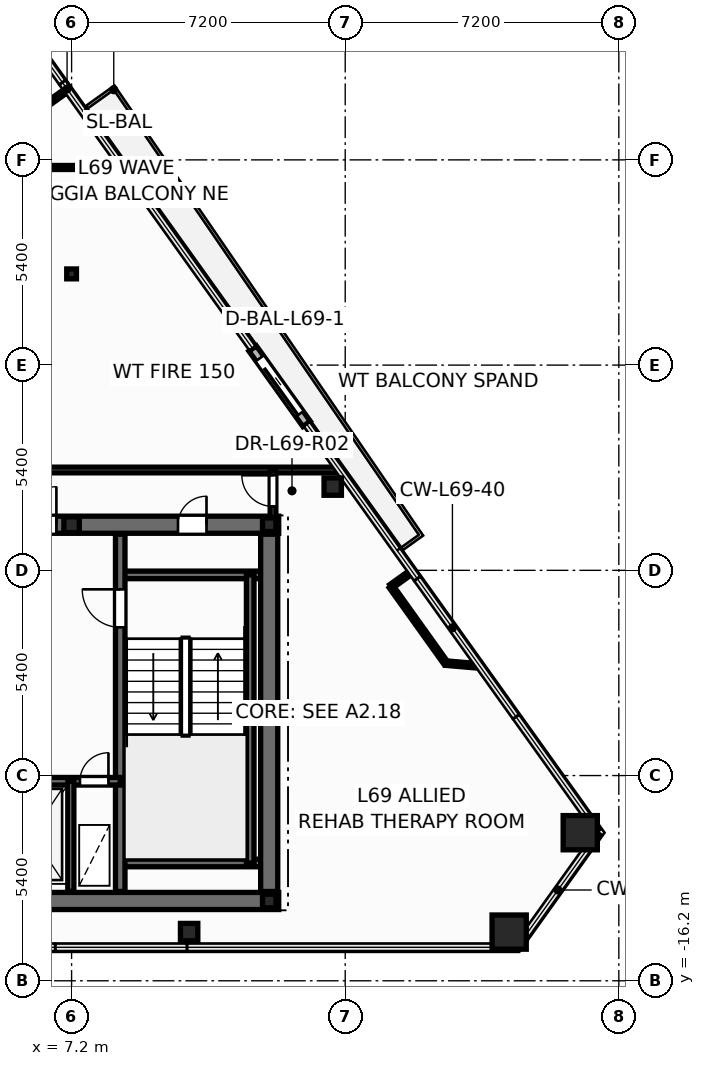
"""IFC4 building model, lengths in metres.
Left out: names, types, materials, properties, quantities, classifications, styles, units other than length and angle.
Written with IfcOpenShell. Run it as: python <this file> out.ifc"""

import sys

from ifc_helpers import new_model, si_unit, direction, frame, frame_2d, origin, origin_2d, place, context, subcontext, project, spatial, rectangle, hollow_rectangle, hollow_circle, i_section, extrude, element, fill, save


model = new_model("IFC4")
c1 = context("Model", 3, precision=1e-05, world=origin(), true_north=direction((0.0, 1.0)))
c2 = subcontext(c1, "Body", "Model", "MODEL_VIEW")
j1 = project(units=[si_unit("LENGTHUNIT", "METRE"), si_unit("PLANEANGLEUNIT", "RADIAN")], contexts=[c1])
p1 = place(None, origin())
s1 = spatial("IfcSite", under=j1, at=p1, CompositionType="ELEMENT")
p2 = place(p1, origin())
s2 = spatial("IfcBuilding", under=s1, at=p2, CompositionType="ELEMENT")
p3 = place(p2, frame((0.0, 0.0, 263.4)))
s3 = spatial("IfcBuildingStorey", under=s2, at=p3, CompositionType="ELEMENT", Elevation=263.4)
for number, where, z_axis, x_axis in (
    (1, (18.714, -14.919, 0.0), (0.0, 0.0, 1.0), (1.0, 0.0, 0.0)),
    (2, (20.585, -12.303, 0.0), (0.0, 0.0, 1.0), (1.0, 0.0, 0.0)),
):
    element("IfcColumn", number, at=place(p3, frame(where, z_axis=z_axis, x_axis=x_axis)), inside=s3, PredefinedType="COLUMN", context=c2, shape_type="SweptSolid", body=[
        extrude(hollow_rectangle(XDim=0.9, YDim=0.9, WallThickness=0.04, at=origin_2d()), origin(), (0.0, 0.0, 1.0), 3.6),
    ])
for number, where, z_axis, x_axis in (
    (3, (10.293, -14.919, 0.0), (0.0, 0.0, 1.0), (1.0, 0.0, 0.0)),
    (4, (14.072, -3.196, 0.0), (0.0, 0.0, 1.0), (1.0, 0.0, 0.0)),
    (5, (8.489, 4.61, 0.0), (0.0, 0.0, 1.0), (1.0, 0.0, 0.0)),
):
    element("IfcColumn", number, at=place(p3, frame(where, z_axis=z_axis, x_axis=x_axis)), inside=s3, PredefinedType="COLUMN", context=c2, shape_type="SweptSolid", body=[
        extrude(hollow_circle(Radius=0.229, WallThickness=0.016, at=origin_2d()), origin(), (0.0, 0.0, 1.0), 3.6),
    ])
for number, where, z_axis, x_axis in (
    (6, (12.4, -14.1, 0.0), (0.0, 0.0, 1.0), (1.0, 0.0, 0.0)),
    (7, (12.4, -4.2, 0.0), (0.0, 0.0, 1.0), (1.0, 0.0, 0.0)),
):
    element("IfcColumn", number, at=place(p3, frame(where, z_axis=z_axis, x_axis=x_axis)), inside=s3, PredefinedType="COLUMN", context=c2, shape_type="SweptSolid", body=[
        extrude(i_section(OverallWidth=0.352, OverallDepth=0.359, WebThickness=0.018, FlangeThickness=0.026, at=origin_2d()), origin(), (0.0, 0.0, 1.0), 3.6),
    ])
p4 = place(p3, frame((7.2, -4.2, 0.0), z_axis=(0.0, 0.0, 1.0), x_axis=(1.0, 0.0, 0.0)))
e8 = element("IfcColumn", 8, at=p4, inside=s3, PredefinedType="PILASTER", context=c2, shape_type="SweptSolid", body=[
    extrude(i_section(OverallWidth=0.405, OverallDepth=0.414, WebThickness=0.022, FlangeThickness=0.032, at=origin_2d()), origin(), (0.0, 0.0, 1.0), 3.6),
])
p5 = place(p3, frame((7.2, 2.4, 0.0), z_axis=(0.0, 0.0, 1.0), x_axis=(1.0, 0.0, 0.0)))
e9 = element("IfcColumn", 9, at=p5, inside=s3, PredefinedType="COLUMN", context=c2, shape_type="SweptSolid", body=[
    extrude(i_section(OverallWidth=0.256, OverallDepth=0.26, WebThickness=0.01, FlangeThickness=0.017, at=origin_2d()), origin(), (0.0, 0.0, 1.0), 3.6),
])
p6 = place(p3, frame((13.383, -1.547, -0.015), z_axis=(0.0, 0.0, 1.0), x_axis=(-0.58167352525, 0.813422344187, 0.0)))
e10 = element("IfcWall", 10, at=p6, inside=s3, PredefinedType="STANDARD", context=c2, shape_type="SweptSolid", body=[
    extrude(rectangle(XDim=2.44, YDim=0.24, at=frame_2d((1.22, 0.0))), origin(), (0.0, 0.0, 1.0), 2.878),
])
p7 = place(p6, frame((0.32, 0.0, 0.015)))
e11 = element("IfcOpeningElement", 11, at=p7, cuts=e10, PredefinedType="OPENING", context=c2, shape_type="SweptSolid", body=[
    extrude(rectangle(XDim=1.806, YDim=2.204, at=frame_2d((0.9, 1.102))), frame((0.0, 0.13, 0.0), z_axis=(0.0, -1.0, 0.0), x_axis=(1.0, 0.0, 0.0)), (0.0, 0.0, 1.0), 0.26),
])
p8 = place(p3, frame((-12.65, -14.1, 0.0), z_axis=(0.0, 0.0, 1.0), x_axis=(1.0, 0.0, 0.0)))
e12 = element("IfcWall", 12, at=p8, inside=s3, PredefinedType="SHEAR", context=c2, shape_type="SweptSolid", body=[
    extrude(rectangle(XDim=25.3, YDim=0.45, at=frame_2d((12.65, 0.0))), origin(), (0.0, 0.0, 1.0), 3.6),
])
p9 = place(p3, frame((-12.65, -4.2, 0.0), z_axis=(0.0, 0.0, 1.0), x_axis=(1.0, 0.0, 0.0)))
e13 = element("IfcWall", 13, at=p9, inside=s3, PredefinedType="SHEAR", context=c2, shape_type="SweptSolid", body=[
    extrude(rectangle(XDim=25.3, YDim=0.45, at=frame_2d((12.65, 0.0))), origin(), (0.0, 0.0, 1.0), 3.6),
])
p10 = place(p9, frame((1.85, 0.0, 0.0)))
e14 = element("IfcOpeningElement", 14, at=p10, cuts=e13, PredefinedType="OPENING", context=c2, shape_type="SweptSolid", body=[
    extrude(rectangle(XDim=0.756, YDim=2.054, at=frame_2d((0.375, 1.027))), frame((0.0, 0.235, 0.0), z_axis=(0.0, -1.0, 0.0), x_axis=(1.0, 0.0, 0.0)), (0.0, 0.0, 1.0), 0.47),
])
p11 = place(p9, frame((22.65, 0.0, 0.0)))
e15 = element("IfcOpeningElement", 15, at=p11, cuts=e13, PredefinedType="OPENING", context=c2, shape_type="SweptSolid", body=[
    extrude(rectangle(XDim=0.756, YDim=2.054, at=frame_2d((0.375, 1.027))), frame((0.0, 0.235, 0.0), z_axis=(0.0, -1.0, 0.0), x_axis=(1.0, 0.0, 0.0)), (0.0, 0.0, 1.0), 0.47),
])
p12 = place(p9, frame((5.85, 0.0, 0.0)))
e16 = element("IfcOpeningElement", 16, at=p12, cuts=e13, PredefinedType="OPENING", context=c2, shape_type="SweptSolid", body=[
    extrude(rectangle(XDim=1.006, YDim=2.104, at=frame_2d((0.5, 1.052))), frame((0.0, 0.235, 0.0), z_axis=(0.0, -1.0, 0.0), x_axis=(1.0, 0.0, 0.0)), (0.0, 0.0, 1.0), 0.47),
])
p13 = place(p9, frame((10.35, 0.0, 0.0)))
e17 = element("IfcOpeningElement", 17, at=p13, cuts=e13, PredefinedType="OPENING", context=c2, shape_type="SweptSolid", body=[
    extrude(rectangle(XDim=1.406, YDim=2.154, at=frame_2d((0.7, 1.077))), frame((0.0, 0.235, 0.0), z_axis=(0.0, -1.0, 0.0), x_axis=(1.0, 0.0, 0.0)), (0.0, 0.0, 1.0), 0.47),
])
p14 = place(p9, frame((18.45, 0.0, 0.0)))
e18 = element("IfcOpeningElement", 18, at=p14, cuts=e13, PredefinedType="OPENING", context=c2, shape_type="SweptSolid", body=[
    extrude(rectangle(XDim=1.006, YDim=2.104, at=frame_2d((0.5, 1.052))), frame((0.0, 0.235, 0.0), z_axis=(0.0, -1.0, 0.0), x_axis=(1.0, 0.0, 0.0)), (0.0, 0.0, 1.0), 0.47),
])
for number, where, z_axis, x_axis in (
    (19, (8.48, -5.52, 0.0), (0.0, 0.0, 1.0), (1.0, 0.0, 0.0)),
    (20, (8.48, -13.1, 0.0), (0.0, 0.0, 1.0), (1.0, 0.0, 0.0)),
):
    element("IfcWall", number, at=place(p3, frame(where, z_axis=z_axis, x_axis=x_axis)), inside=s3, PredefinedType="SOLIDWALL", context=c2, shape_type="SweptSolid", body=[
        extrude(rectangle(XDim=3.87, YDim=0.2, at=frame_2d((1.935, 0.0))), origin(), (0.0, 0.0, 1.0), 3.6),
    ])
p15 = place(p3, frame((11.9, -13.1, 0.0), z_axis=(0.0, 0.0, 1.0), x_axis=(0.0, 1.0, 0.0)))
e21 = element("IfcWall", 21, at=p15, inside=s3, PredefinedType="SOLIDWALL", context=c2, shape_type="SweptSolid", body=[
    extrude(rectangle(XDim=7.58, YDim=0.2, at=frame_2d((3.79, 0.0))), origin(), (0.0, 0.0, 1.0), 3.6),
])
p16 = place(p3, frame((8.48, -13.85, 0.0), z_axis=(0.0, 0.0, 1.0), x_axis=(0.0, 1.0, 0.0)))
e22 = element("IfcWall", 22, at=p16, inside=s3, PredefinedType="SHEAR", context=c2, shape_type="SweptSolid", body=[
    extrude(rectangle(XDim=9.4, YDim=0.25, at=frame_2d((4.7, 0.0))), origin(), (0.0, 0.0, 1.0), 3.6),
])
p17 = place(p16, frame((6.95, 0.0, 0.0)))
e23 = element("IfcOpeningElement", 23, at=p17, cuts=e22, PredefinedType="OPENING", context=c2, shape_type="SweptSolid", body=[
    extrude(rectangle(XDim=1.006, YDim=2.104, at=frame_2d((0.5, 1.052))), frame((0.0, 0.135, 0.0), z_axis=(0.0, -1.0, 0.0), x_axis=(1.0, 0.0, 0.0)), (0.0, 0.0, 1.0), 0.27),
])
p18 = place(p3, frame((5.12, -10.95, 0.0), z_axis=(0.0, 0.0, 1.0), x_axis=(1.0, 0.0, 0.0)))
e24 = element("IfcWall", 24, at=p18, inside=s3, PredefinedType="SOLIDWALL", context=c2, shape_type="SweptSolid", body=[
    extrude(rectangle(XDim=3.36, YDim=0.2, at=frame_2d((1.68, 0.0))), origin(), (0.0, 0.0, 1.0), 3.6),
])
p19 = place(p18, frame((0.42, 0.0, 0.0)))
e25 = element("IfcOpeningElement", 25, at=p19, cuts=e24, PredefinedType="OPENING", context=c2, shape_type="SweptSolid", body=[
    extrude(rectangle(XDim=1.106, YDim=2.104, at=frame_2d((0.55, 1.052))), frame((0.0, 0.11, 0.0), z_axis=(0.0, -1.0, 0.0), x_axis=(1.0, 0.0, 0.0)), (0.0, 0.0, 1.0), 0.22),
])
p20 = place(p18, frame((2.3, 0.0, 0.0)))
e26 = element("IfcOpeningElement", 26, at=p20, cuts=e24, PredefinedType="OPENING", context=c2, shape_type="SweptSolid", body=[
    extrude(rectangle(XDim=0.756, YDim=2.054, at=frame_2d((0.375, 1.027))), frame((0.0, 0.11, 0.0), z_axis=(0.0, -1.0, 0.0), x_axis=(1.0, 0.0, 0.0)), (0.0, 0.0, 1.0), 0.22),
])
p21 = place(p3, frame((7.18, -13.85, 0.0), z_axis=(0.0, 0.0, 1.0), x_axis=(0.0, 1.0, 0.0)))
e27 = element("IfcWall", 27, at=p21, inside=s3, PredefinedType="PARTITIONING", context=c2, shape_type="SweptSolid", body=[
    extrude(rectangle(XDim=2.9, YDim=0.16, at=frame_2d((1.45, 0.0))), origin(), (0.0, 0.0, 1.0), 2.57),
])
p22 = place(p3, frame((12.4, -13.85, 0.0), z_axis=(0.0, 0.0, 1.0), x_axis=(0.0, 1.0, 0.0)))
e28 = element("IfcWall", 28, at=p22, inside=s3, PredefinedType="SHEAR", context=c2, shape_type="SweptSolid", body=[
    extrude(rectangle(XDim=9.4, YDim=0.45, at=frame_2d((4.7, 0.0))), origin(), (0.0, 0.0, 1.0), 3.6),
])
p23 = place(p3, frame((-0.64, -2.76, 0.0), z_axis=(0.0, 0.0, 1.0), x_axis=(1.0, 0.0, 0.0)))
e29 = element("IfcWall", 29, at=p23, inside=s3, PredefinedType="PARTITIONING", context=c2, shape_type="SweptSolid", body=[
    extrude(rectangle(XDim=14.891, YDim=0.15, at=frame_2d((7.446, 0.0))), origin(), (0.0, 0.0, 1.0), 2.32),
])
p24 = place(p23, frame((2.193, 0.0, 0.0)))
e30 = element("IfcOpeningElement", 30, at=p24, cuts=e29, PredefinedType="OPENING", context=c2, shape_type="SweptSolid", body=[
    extrude(rectangle(XDim=0.906, YDim=2.104, at=frame_2d((0.45, 1.052))), frame((0.0, 0.085, 0.0), z_axis=(0.0, -1.0, 0.0), x_axis=(1.0, 0.0, 0.0)), (0.0, 0.0, 1.0), 0.17),
])
p25 = place(p3, frame((-0.64, 5.2, 0.0), z_axis=(0.0, 0.0, 1.0), x_axis=(1.0, 0.0, 0.0)))
e31 = element("IfcWall", 31, at=p25, inside=s3, PredefinedType="PARTITIONING", context=c2, shape_type="SweptSolid", body=[
    extrude(rectangle(XDim=9.198, YDim=0.105, at=frame_2d((4.599, 0.0))), origin(), (0.0, 0.0, 1.0), 2.32),
])
p26 = place(p3, frame((17.049, -7.841, 0.0), z_axis=(0.0, 0.0, 1.0), x_axis=(-0.581685079242, 0.813414081872, 0.0)))
e32 = element("IfcWall", 32, at=p26, inside=s3, PredefinedType="PARTITIONING", context=c2, shape_type="SweptSolid", body=[
    extrude(rectangle(XDim=2.48, YDim=0.12, at=frame_2d((1.24, 0.0))), origin(), (0.0, 0.0, 1.0), 3.345),
])
p27 = place(p3, frame((12.5, -4.24, 0.0), z_axis=(0.0, 0.0, 1.0), x_axis=(0.0, 1.0, 0.0)))
e33 = element("IfcWall", 33, at=p27, inside=s3, PredefinedType="PARTITIONING", context=c2, shape_type="SweptSolid", body=[
    extrude(rectangle(XDim=1.48, YDim=0.15, at=frame_2d((0.74, 0.0))), origin(), (0.0, 0.0, 1.0), 2.32),
])
p28 = place(p27, frame((0.522, 0.0, 0.0)))
e34 = element("IfcOpeningElement", 34, at=p28, cuts=e33, PredefinedType="OPENING", context=c2, shape_type="SweptSolid", body=[
    extrude(rectangle(XDim=0.826, YDim=2.104, at=frame_2d((0.41, 1.052))), frame((0.0, 0.085, 0.0), z_axis=(0.0, -1.0, 0.0), x_axis=(1.0, 0.0, 0.0)), (0.0, 0.0, 1.0), 0.17),
])
p29 = place(p3, frame((17.927, -7.917, 0.0), z_axis=(0.0, 0.0, 1.0), x_axis=(-0.996304768975, 0.085888342153, 0.0)))
e35 = element("IfcWall", 35, at=p29, inside=s3, PredefinedType="PARTITIONING", context=c2, shape_type="SweptSolid", body=[
    extrude(rectangle(XDim=0.881, YDim=0.12, at=frame_2d((0.44, 0.0))), origin(), (0.0, 0.0, 1.0), 2.863),
])
p30 = place(p3, frame((7.085, 7.242, 0.0), z_axis=(0.0, 0.0, 1.0), x_axis=(-0.813388759568, -0.581720487698, 0.0)))
e36 = element("IfcWall", 36, at=p30, inside=s3, PredefinedType="PARTITIONING", context=c2, shape_type="SweptSolid", body=[
    extrude(rectangle(XDim=0.67, YDim=0.12, at=frame_2d((0.335, 0.0))), origin(), (0.0, 0.0, 1.0), 2.863),
])
p31 = place(p3, frame((15.606, -5.824, 0.0), z_axis=(0.0, 0.0, 1.0), x_axis=(0.813265440227, 0.581892879947, 0.0)))
e37 = element("IfcWall", 37, at=p31, inside=s3, PredefinedType="PARTITIONING", context=c2, shape_type="SweptSolid", body=[
    extrude(rectangle(XDim=0.67, YDim=0.12, at=frame_2d((0.335, 0.0))), origin(), (0.0, 0.0, 1.0), 2.863),
])
p32 = place(p7, origin())
e38 = element("IfcDoor", 38, at=p32, inside=s3, OperationType="SLIDING_TO_LEFT", PredefinedType="DOOR", context=c2, shape_type="SweptSolid", body=[
    extrude(rectangle(XDim=1.8, YDim=2.2, at=frame_2d((0.9, 1.1))), frame((0.0, 0.025, 0.0), z_axis=(0.0, -1.0, 0.0), x_axis=(1.0, 0.0, 0.0)), (0.0, 0.0, 1.0), 0.05),
])
fill(e11, e38)
p33 = place(p17, origin())
e39 = element("IfcDoor", 39, at=p33, inside=s3, OperationType="SINGLE_SWING_RIGHT", PredefinedType="DOOR", context=c2, shape_type="SweptSolid", body=[
    extrude(rectangle(XDim=1.0, YDim=2.1, at=frame_2d((0.5, 1.05))), frame((0.0, 0.025, 0.0), z_axis=(0.0, -1.0, 0.0), x_axis=(1.0, 0.0, 0.0)), (0.0, 0.0, 1.0), 0.05),
])
fill(e23, e39)
p34 = place(p20, origin())
e40 = element("IfcDoor", 40, at=p34, inside=s3, OperationType="SINGLE_SWING_RIGHT", PredefinedType="DOOR", context=c2, shape_type="SweptSolid", body=[
    extrude(rectangle(XDim=0.75, YDim=2.05, at=frame_2d((0.375, 1.025))), frame((0.0, 0.025, 0.0), z_axis=(0.0, -1.0, 0.0), x_axis=(1.0, 0.0, 0.0)), (0.0, 0.0, 1.0), 0.05),
])
fill(e26, e40)
p35 = place(p11, origin())
e41 = element("IfcDoor", 41, at=p35, inside=s3, OperationType="SINGLE_SWING_RIGHT", PredefinedType="DOOR", context=c2, shape_type="SweptSolid", body=[
    extrude(rectangle(XDim=0.75, YDim=2.05, at=frame_2d((0.375, 1.025))), frame((0.0, 0.025, 0.0), z_axis=(0.0, -1.0, 0.0), x_axis=(1.0, 0.0, 0.0)), (0.0, 0.0, 1.0), 0.05),
])
fill(e15, e41)
p36 = place(p14, origin())
e42 = element("IfcDoor", 42, at=p36, inside=s3, OperationType="SINGLE_SWING_RIGHT", PredefinedType="DOOR", context=c2, shape_type="SweptSolid", body=[
    extrude(rectangle(XDim=1.0, YDim=2.1, at=frame_2d((0.5, 1.05))), frame((0.0, 0.025, 0.0), z_axis=(0.0, -1.0, 0.0), x_axis=(1.0, 0.0, 0.0)), (0.0, 0.0, 1.0), 0.05),
])
fill(e18, e42)
p37 = place(p28, origin())
e43 = element("IfcDoor", 43, at=p37, inside=s3, OperationType="SINGLE_SWING_RIGHT", PredefinedType="DOOR", context=c2, shape_type="SweptSolid", body=[
    extrude(rectangle(XDim=0.82, YDim=2.1, at=frame_2d((0.41, 1.05))), frame((0.0, 0.025, 0.0), z_axis=(0.0, -1.0, 0.0), x_axis=(1.0, 0.0, 0.0)), (0.0, 0.0, 1.0), 0.05),
])
fill(e34, e43)
save(model, sys.argv[1])
